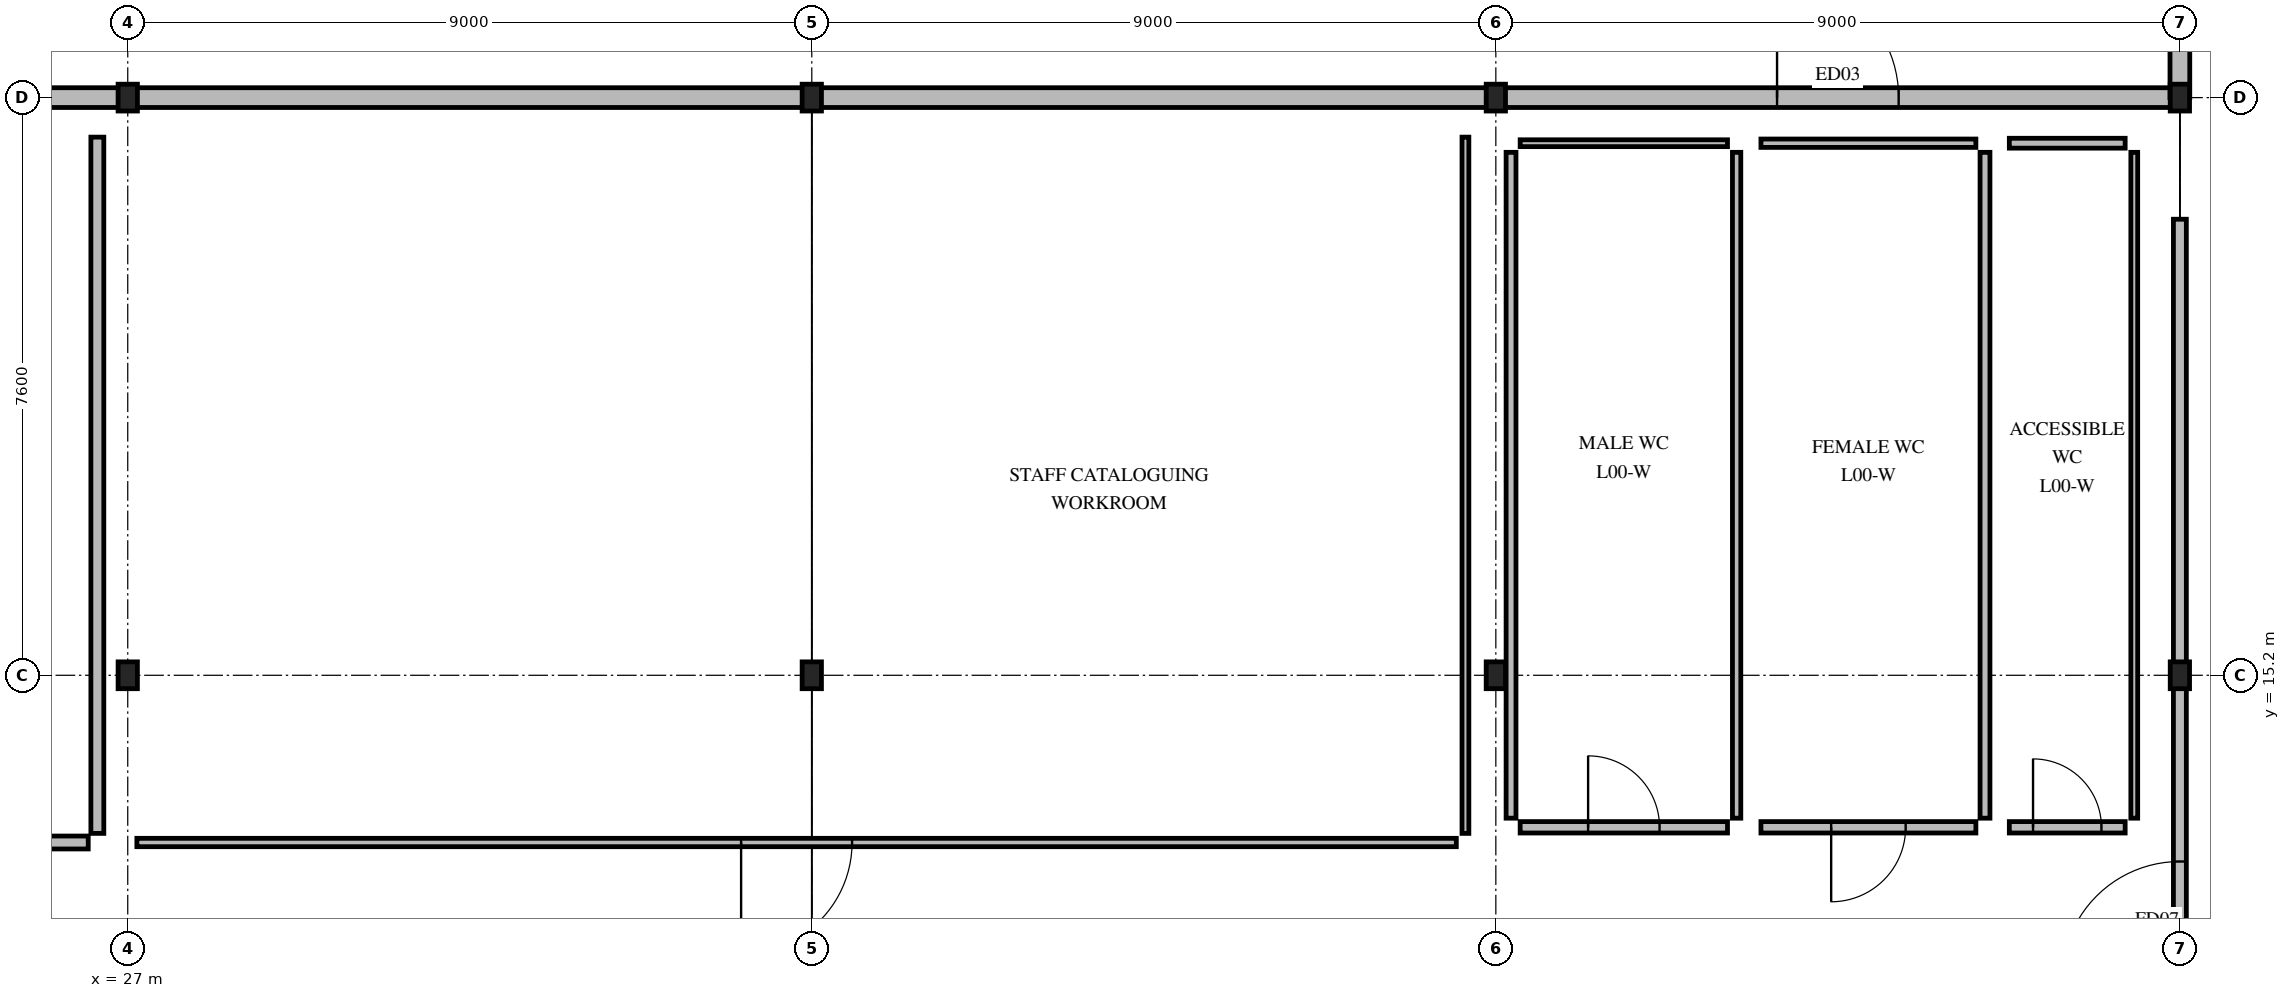
"""IFC4 building model, lengths in metres.
Left out: names, types, materials, properties, quantities, classifications, styles, units other than length and angle.
Written with IfcOpenShell. Run it as: python <this file> out.ifc"""

import sys

from ifc_helpers import new_model, si_unit, direction, frame, frame_2d, origin, origin_2d, place, context, subcontext, project, spatial, rectangle, i_section, extrude, element, fill, save


model = new_model("IFC4")
c1 = context("Model", 3, precision=1e-05, world=origin(), true_north=direction((0.0, 1.0)))
c2 = subcontext(c1, "Body", "Model", "MODEL_VIEW")
j1 = project(units=[si_unit("LENGTHUNIT", "METRE"), si_unit("PLANEANGLEUNIT", "RADIAN")], contexts=[c1])
p1 = place(None, origin())
s1 = spatial("IfcSite", under=j1, at=p1, CompositionType="ELEMENT")
p2 = place(p1, origin())
s2 = spatial("IfcBuilding", under=s1, at=p2, CompositionType="ELEMENT")
p3 = place(p2, origin())
s3 = spatial("IfcBuildingStorey", under=s2, at=p3, CompositionType="ELEMENT", Elevation=0.0)
for number, where, z_axis, x_axis in (
    (1, (27.0, 15.2, 0.0), (0.0, 0.0, 1.0), (1.0, 0.0, 0.0)),
    (2, (27.0, 22.8, 0.0), (0.0, 0.0, 1.0), (1.0, 0.0, 0.0)),
    (3, (36.0, 15.2, 0.0), (0.0, 0.0, 1.0), (1.0, 0.0, 0.0)),
    (4, (36.0, 22.8, 0.0), (0.0, 0.0, 1.0), (1.0, 0.0, 0.0)),
    (5, (45.0, 15.2, 0.0), (0.0, 0.0, 1.0), (1.0, 0.0, 0.0)),
    (6, (45.0, 22.8, 0.0), (0.0, 0.0, 1.0), (1.0, 0.0, 0.0)),
    (7, (54.0, 15.2, 0.0), (0.0, 0.0, 1.0), (1.0, 0.0, 0.0)),
    (8, (54.0, 22.8, 0.0), (0.0, 0.0, 1.0), (1.0, 0.0, 0.0)),
):
    element("IfcColumn", number, at=place(p3, frame(where, z_axis=z_axis, x_axis=x_axis)), inside=s3, PredefinedType="COLUMN", context=c2, shape_type="SweptSolid", body=[
        extrude(i_section(OverallWidth=0.254, OverallDepth=0.353, WebThickness=0.01, FlangeThickness=0.016, FilletRadius=0.015, at=origin_2d()), origin(), (0.0, 0.0, 1.0), 5.04),
    ])
p4 = place(p3, frame((18.0, 22.8, 0.0), z_axis=(0.0, 0.0, 1.0), x_axis=(1.0, 0.0, 0.0)))
e9 = element("IfcWall", 9, at=p4, inside=s3, PredefinedType="STANDARD", context=c2, shape_type="SweptSolid", body=[
    extrude(rectangle(XDim=9.0, YDim=0.26, at=frame_2d((4.5, 0.0))), origin(), (0.0, 0.0, 1.0), 4.371),
])
p5 = place(p4, frame((3.7, 0.0, 0.0)))
e10 = element("IfcOpeningElement", 10, at=p5, cuts=e9, PredefinedType="OPENING", context=c2, shape_type="SweptSolid", body=[
    extrude(rectangle(XDim=1.6, YDim=2.2, at=frame_2d((0.8, 1.1))), frame((0.0, 0.14, 0.0), z_axis=(0.0, -1.0, 0.0), x_axis=(1.0, 0.0, 0.0)), (0.0, 0.0, 1.0), 0.28),
])
for number, where, z_axis, x_axis in (
    (11, (27.0, 22.8, 0.0), (0.0, 0.0, 1.0), (1.0, 0.0, 0.0)),
    (12, (36.0, 22.8, 0.0), (0.0, 0.0, 1.0), (1.0, 0.0, 0.0)),
):
    element("IfcWall", number, at=place(p3, frame(where, z_axis=z_axis, x_axis=x_axis)), inside=s3, PredefinedType="STANDARD", context=c2, shape_type="SweptSolid", body=[
        extrude(rectangle(XDim=9.0, YDim=0.26, at=frame_2d((4.5, 0.0))), origin(), (0.0, 0.0, 1.0), 4.371),
    ])
p6 = place(p3, frame((45.0, 22.8, 0.0), z_axis=(0.0, 0.0, 1.0), x_axis=(1.0, 0.0, 0.0)))
e13 = element("IfcWall", 13, at=p6, inside=s3, PredefinedType="STANDARD", context=c2, shape_type="SweptSolid", body=[
    extrude(rectangle(XDim=9.0, YDim=0.26, at=frame_2d((4.5, 0.0))), origin(), (0.0, 0.0, 1.0), 4.371),
])
p7 = place(p6, frame((3.7, 0.0, 0.0)))
e14 = element("IfcOpeningElement", 14, at=p7, cuts=e13, PredefinedType="OPENING", context=c2, shape_type="SweptSolid", body=[
    extrude(rectangle(XDim=1.6, YDim=2.2, at=frame_2d((0.8, 1.1))), frame((0.0, 0.14, 0.0), z_axis=(0.0, -1.0, 0.0), x_axis=(1.0, 0.0, 0.0)), (0.0, 0.0, 1.0), 0.28),
])
p8 = place(p3, frame((54.0, 22.8, 0.0), z_axis=(0.0, 0.0, 1.0), x_axis=(0.0, 1.0, 0.0)))
e15 = element("IfcWall", 15, at=p8, inside=s3, PredefinedType="STANDARD", context=c2, shape_type="SweptSolid", body=[
    extrude(rectangle(XDim=7.81, YDim=0.26, at=frame_2d((3.905, 0.0))), origin(), (0.0, 0.0, 1.0), 4.319),
])
p9 = place(p8, frame((3.05, 0.0, 0.85)))
e16 = element("IfcOpeningElement", 16, at=p9, cuts=e15, PredefinedType="OPENING", context=c2, shape_type="SweptSolid", body=[
    extrude(rectangle(XDim=1.5, YDim=1.2, at=frame_2d((0.75, 0.6))), frame((0.0, 0.14, 0.0), z_axis=(0.0, -1.0, 0.0), x_axis=(1.0, 0.0, 0.0)), (0.0, 0.0, 1.0), 0.28),
])
p10 = place(p3, frame((54.0, 9.2, 0.0), z_axis=(0.0, 0.0, 1.0), x_axis=(0.0, 1.0, 0.0)))
e17 = element("IfcWall", 17, at=p10, inside=s3, PredefinedType="PARTITIONING", context=c2, shape_type="SweptSolid", body=[
    extrude(rectangle(XDim=12.0, YDim=0.17, at=frame_2d((6.0, 0.0))), origin(), (0.0, 0.0, 1.0), 4.319),
])
p11 = place(p10, frame((2.0, 0.0, 0.0)))
e18 = element("IfcOpeningElement", 18, at=p11, cuts=e17, PredefinedType="OPENING", context=c2, shape_type="SweptSolid", body=[
    extrude(rectangle(XDim=1.55, YDim=2.2, at=frame_2d((0.775, 1.1))), frame((0.0, 0.095, 0.0), z_axis=(0.0, -1.0, 0.0), x_axis=(1.0, 0.0, 0.0)), (0.0, 0.0, 1.0), 0.19),
])
p12 = place(p3, frame((0.52, 13.0, 0.0), z_axis=(0.0, 0.0, 1.0), x_axis=(1.0, 0.0, 0.0)))
e19 = element("IfcWall", 19, at=p12, inside=s3, PredefinedType="PARTITIONING", context=c2, shape_type="SweptSolid", body=[
    extrude(rectangle(XDim=25.96, YDim=0.17, at=frame_2d((12.98, 0.0))), origin(), (0.0, 0.0, 1.0), 4.76),
])
p13 = place(p12, frame((12.405, 0.0, 0.0)))
e20 = element("IfcOpeningElement", 20, at=p13, cuts=e19, PredefinedType="OPENING", context=c2, shape_type="SweptSolid", body=[
    extrude(rectangle(XDim=1.15, YDim=2.15, at=frame_2d((0.575, 1.075))), frame((0.0, 0.095, 0.0), z_axis=(0.0, -1.0, 0.0), x_axis=(1.0, 0.0, 0.0)), (0.0, 0.0, 1.0), 0.19),
])
p14 = place(p3, frame((26.6, 13.12, 0.0), z_axis=(0.0, 0.0, 1.0), x_axis=(0.0, 1.0, 0.0)))
e21 = element("IfcWall", 21, at=p14, inside=s3, PredefinedType="PARTITIONING", context=c2, shape_type="SweptSolid", body=[
    extrude(rectangle(XDim=9.16, YDim=0.17, at=frame_2d((4.58, 0.0))), origin(), (0.0, 0.0, 1.0), 4.76),
])
p15 = place(p3, frame((27.12, 13.0, 0.0), z_axis=(0.0, 0.0, 1.0), x_axis=(1.0, 0.0, 0.0)))
e22 = element("IfcWall", 22, at=p15, inside=s3, PredefinedType="PARTITIONING", context=c2, shape_type="SweptSolid", body=[
    extrude(rectangle(XDim=17.36, YDim=0.11, at=frame_2d((8.68, 0.0))), origin(), (0.0, 0.0, 1.0), 4.76),
])
p16 = place(p15, frame((7.95, 0.0, 0.0)))
e23 = element("IfcOpeningElement", 23, at=p16, cuts=e22, PredefinedType="OPENING", context=c2, shape_type="SweptSolid", body=[
    extrude(rectangle(XDim=1.46, YDim=2.1, at=frame_2d((0.73, 1.05))), frame((0.0, 0.065, 0.0), z_axis=(0.0, -1.0, 0.0), x_axis=(1.0, 0.0, 0.0)), (0.0, 0.0, 1.0), 0.13),
])
p17 = place(p3, frame((44.6, 13.12, 0.0), z_axis=(0.0, 0.0, 1.0), x_axis=(0.0, 1.0, 0.0)))
e24 = element("IfcWall", 24, at=p17, inside=s3, PredefinedType="PARTITIONING", context=c2, shape_type="SweptSolid", body=[
    extrude(rectangle(XDim=9.16, YDim=0.09, at=frame_2d((4.58, 0.0))), origin(), (0.0, 0.0, 1.0), 4.76),
])
p18 = place(p3, frame((45.32, 13.2, 0.0), z_axis=(0.0, 0.0, 1.0), x_axis=(1.0, 0.0, 0.0)))
e25 = element("IfcWall", 25, at=p18, inside=s3, PredefinedType="PARTITIONING", context=c2, shape_type="SweptSolid", body=[
    extrude(rectangle(XDim=2.728, YDim=0.15, at=frame_2d((1.364, 0.0))), origin(), (0.0, 0.0, 1.0), 4.76),
])
p19 = place(p18, frame((0.894, 0.0, 0.0)))
e26 = element("IfcOpeningElement", 26, at=p19, cuts=e25, PredefinedType="OPENING", context=c2, shape_type="SweptSolid", body=[
    extrude(rectangle(XDim=0.94, YDim=2.06, at=frame_2d((0.47, 1.03))), frame((0.0, 0.085, 0.0), z_axis=(0.0, -1.0, 0.0), x_axis=(1.0, 0.0, 0.0)), (0.0, 0.0, 1.0), 0.17),
])
p20 = place(p3, frame((45.2, 13.32, 0.0), z_axis=(0.0, 0.0, 1.0), x_axis=(0.0, 1.0, 0.0)))
e27 = element("IfcWall", 27, at=p20, inside=s3, PredefinedType="PARTITIONING", context=c2, shape_type="SweptSolid", body=[
    extrude(rectangle(XDim=8.76, YDim=0.13, at=frame_2d((4.38, 0.0))), origin(), (0.0, 0.0, 1.0), 4.359),
])
p21 = place(p3, frame((48.168, 13.32, 0.0), z_axis=(0.0, 0.0, 1.0), x_axis=(0.0, 1.0, 0.0)))
e28 = element("IfcWall", 28, at=p21, inside=s3, PredefinedType="PARTITIONING", context=c2, shape_type="SweptSolid", body=[
    extrude(rectangle(XDim=8.76, YDim=0.11, at=frame_2d((4.38, 0.0))), origin(), (0.0, 0.0, 1.0), 4.76),
])
p22 = place(p3, frame((45.32, 22.2, 0.0), z_axis=(0.0, 0.0, 1.0), x_axis=(1.0, 0.0, 0.0)))
e29 = element("IfcWall", 29, at=p22, inside=s3, PredefinedType="PARTITIONING", context=c2, shape_type="SweptSolid", body=[
    extrude(rectangle(XDim=2.728, YDim=0.09, at=frame_2d((1.364, 0.0))), origin(), (0.0, 0.0, 1.0), 4.76),
])
p23 = place(p3, frame((48.488, 13.2, 0.0), z_axis=(0.0, 0.0, 1.0), x_axis=(1.0, 0.0, 0.0)))
e30 = element("IfcWall", 30, at=p23, inside=s3, PredefinedType="PARTITIONING", context=c2, shape_type="SweptSolid", body=[
    extrude(rectangle(XDim=2.828, YDim=0.15, at=frame_2d((1.414, 0.0))), origin(), (0.0, 0.0, 1.0), 4.76),
])
p24 = place(p23, frame((0.924, 0.0, 0.0)))
e31 = element("IfcOpeningElement", 31, at=p24, cuts=e30, PredefinedType="OPENING", context=c2, shape_type="SweptSolid", body=[
    extrude(rectangle(XDim=0.98, YDim=2.06, at=frame_2d((0.49, 1.03))), frame((0.0, 0.085, 0.0), z_axis=(0.0, -1.0, 0.0), x_axis=(1.0, 0.0, 0.0)), (0.0, 0.0, 1.0), 0.17),
])
p25 = place(p3, frame((51.436, 13.32, 0.0), z_axis=(0.0, 0.0, 1.0), x_axis=(0.0, 1.0, 0.0)))
e32 = element("IfcWall", 32, at=p25, inside=s3, PredefinedType="PARTITIONING", context=c2, shape_type="SweptSolid", body=[
    extrude(rectangle(XDim=8.76, YDim=0.13, at=frame_2d((4.38, 0.0))), origin(), (0.0, 0.0, 1.0), 4.76),
])
p26 = place(p3, frame((48.488, 22.2, 0.0), z_axis=(0.0, 0.0, 1.0), x_axis=(1.0, 0.0, 0.0)))
e33 = element("IfcWall", 33, at=p26, inside=s3, PredefinedType="PARTITIONING", context=c2, shape_type="SweptSolid", body=[
    extrude(rectangle(XDim=2.828, YDim=0.11, at=frame_2d((1.414, 0.0))), origin(), (0.0, 0.0, 1.0), 4.76),
])
p27 = place(p3, frame((53.4, 13.32, 0.0), z_axis=(0.0, 0.0, 1.0), x_axis=(0.0, 1.0, 0.0)))
e34 = element("IfcWall", 34, at=p27, inside=s3, PredefinedType="PARTITIONING", context=c2, shape_type="SweptSolid", body=[
    extrude(rectangle(XDim=8.76, YDim=0.09, at=frame_2d((4.38, 0.0))), origin(), (0.0, 0.0, 1.0), 4.76),
])
p28 = place(p3, frame((51.756, 13.2, 0.0), z_axis=(0.0, 0.0, 1.0), x_axis=(1.0, 0.0, 0.0)))
e35 = element("IfcWall", 35, at=p28, inside=s3, PredefinedType="PARTITIONING", context=c2, shape_type="SweptSolid", body=[
    extrude(rectangle(XDim=1.524, YDim=0.15, at=frame_2d((0.762, 0.0))), origin(), (0.0, 0.0, 1.0), 4.76),
])
p29 = place(p28, frame((0.312, 0.0, 0.0)))
e36 = element("IfcOpeningElement", 36, at=p29, cuts=e35, PredefinedType="OPENING", context=c2, shape_type="SweptSolid", body=[
    extrude(rectangle(XDim=0.9, YDim=2.06, at=frame_2d((0.45, 1.03))), frame((0.0, 0.085, 0.0), z_axis=(0.0, -1.0, 0.0), x_axis=(1.0, 0.0, 0.0)), (0.0, 0.0, 1.0), 0.17),
])
p30 = place(p3, frame((51.756, 22.2, 0.0), z_axis=(0.0, 0.0, 1.0), x_axis=(1.0, 0.0, 0.0)))
e37 = element("IfcWall", 37, at=p30, inside=s3, PredefinedType="PARTITIONING", context=c2, shape_type="SweptSolid", body=[
    extrude(rectangle(XDim=1.524, YDim=0.13, at=frame_2d((0.762, 0.0))), origin(), (0.0, 0.0, 1.0), 4.76),
])
p31 = place(p7, origin())
e38 = element("IfcDoor", 38, at=p31, inside=s3, OperationType="SINGLE_SWING_LEFT", PredefinedType="DOOR", context=c2, shape_type="SweptSolid", body=[
    extrude(rectangle(XDim=1.6, YDim=2.2, at=frame_2d((0.8, 1.1))), frame((0.0, 0.025, 0.0), z_axis=(0.0, -1.0, 0.0), x_axis=(1.0, 0.0, 0.0)), (0.0, 0.0, 1.0), 0.05),
])
fill(e14, e38)
p32 = place(p11, origin())
e39 = element("IfcDoor", 39, at=p32, inside=s3, OperationType="SINGLE_SWING_LEFT", PredefinedType="DOOR", context=c2, shape_type="SweptSolid", body=[
    extrude(rectangle(XDim=1.55, YDim=2.2, at=frame_2d((0.775, 1.1))), frame((0.0, 0.025, 0.0), z_axis=(0.0, -1.0, 0.0), x_axis=(1.0, 0.0, 0.0)), (0.0, 0.0, 1.0), 0.05),
])
fill(e18, e39)
p33 = place(p16, origin())
e40 = element("IfcDoor", 40, at=p33, inside=s3, OperationType="SINGLE_SWING_RIGHT", PredefinedType="DOOR", context=c2, shape_type="SweptSolid", body=[
    extrude(rectangle(XDim=1.46, YDim=2.1, at=frame_2d((0.73, 1.05))), frame((0.0, 0.025, 0.0), z_axis=(0.0, -1.0, 0.0), x_axis=(1.0, 0.0, 0.0)), (0.0, 0.0, 1.0), 0.05),
])
fill(e23, e40)
p34 = place(p19, origin())
e41 = element("IfcDoor", 41, at=p34, inside=s3, OperationType="SINGLE_SWING_LEFT", PredefinedType="DOOR", context=c2, shape_type="SweptSolid", body=[
    extrude(rectangle(XDim=0.94, YDim=2.06, at=frame_2d((0.47, 1.03))), frame((0.0, 0.025, 0.0), z_axis=(0.0, -1.0, 0.0), x_axis=(1.0, 0.0, 0.0)), (0.0, 0.0, 1.0), 0.05),
])
fill(e26, e41)
p35 = place(p24, origin())
e42 = element("IfcDoor", 42, at=p35, inside=s3, OperationType="SINGLE_SWING_RIGHT", PredefinedType="DOOR", context=c2, shape_type="SweptSolid", body=[
    extrude(rectangle(XDim=0.98, YDim=2.06, at=frame_2d((0.49, 1.03))), frame((0.0, 0.025, 0.0), z_axis=(0.0, -1.0, 0.0), x_axis=(1.0, 0.0, 0.0)), (0.0, 0.0, 1.0), 0.05),
])
fill(e31, e42)
p36 = place(p29, origin())
e43 = element("IfcDoor", 43, at=p36, inside=s3, OperationType="SINGLE_SWING_LEFT", PredefinedType="DOOR", context=c2, shape_type="SweptSolid", body=[
    extrude(rectangle(XDim=0.9, YDim=2.06, at=frame_2d((0.45, 1.03))), frame((0.0, 0.025, 0.0), z_axis=(0.0, -1.0, 0.0), x_axis=(1.0, 0.0, 0.0)), (0.0, 0.0, 1.0), 0.05),
])
fill(e36, e43)
save(model, sys.argv[1])
